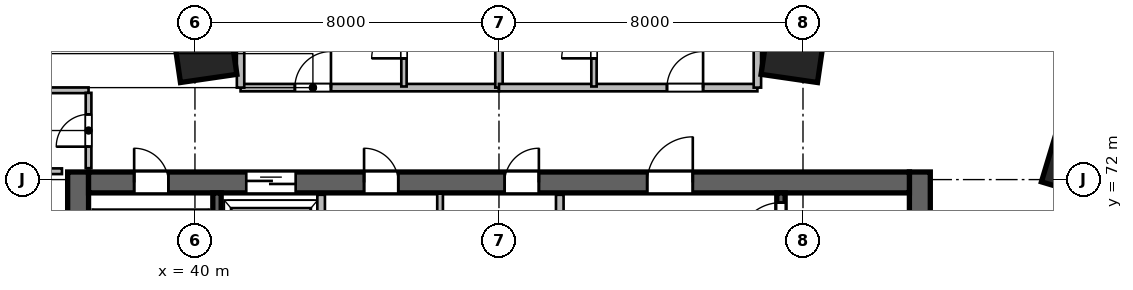
"""IFC4 building model, lengths in metres.
Left out: names, types, materials, properties, quantities, classifications, styles, units other than length and angle.
Written with IfcOpenShell. Run it as: python <this file> out.ifc"""

import sys

from ifc_helpers import new_model, si_unit, direction, frame, frame_2d, origin, origin_2d, place, context, subcontext, project, spatial, rectangle, extrude, source, transform, mapped, element, fill, save


model = new_model("IFC4")
c1 = context("Model", 3, precision=1e-05, world=origin(), true_north=direction((0.0, 1.0)))
c2 = subcontext(c1, "Body", "Model", "MODEL_VIEW")
j1 = project(units=[si_unit("LENGTHUNIT", "METRE"), si_unit("PLANEANGLEUNIT", "RADIAN")], contexts=[c1])
p1 = place(None, origin())
s1 = spatial("IfcSite", under=j1, at=p1, CompositionType="ELEMENT")
p2 = place(p1, origin())
s2 = spatial("IfcBuilding", under=s1, at=p2, CompositionType="ELEMENT")
p3 = place(p2, frame((0.0, 0.0, 46.2)))
s3 = spatial("IfcBuildingStorey", under=s2, at=p3, CompositionType="ELEMENT", Elevation=46.2)
m1 = source(origin(), c2, "Body", "SweptSolid", [
    extrude(rectangle(XDim=12.0, YDim=0.55, at=frame_2d((6.0, 0.0))), origin(), (0.0, 0.0, 1.0), 3.6),
])
for number, where, z_axis, x_axis in (
    (1, (36.925, 60.2, 0.0), (0.0, 0.0, 1.0), (0.0, 1.0, 0.0)),
    (2, (59.075, 60.2, 0.0), (0.0, 0.0, 1.0), (0.0, 1.0, 0.0)),
):
    element("IfcWall", number, at=place(p3, frame(where, z_axis=z_axis, x_axis=x_axis)), inside=s3, PredefinedType="SHEAR", context=c2, shape_type="MappedRepresentation", body=[
        mapped(m1, transform((0.0, 0.0, 0.0), scale=1.0)),
    ])
m2 = source(origin(), c2, "Body", "SweptSolid", [
    extrude(rectangle(XDim=21.6, YDim=0.55, at=frame_2d((10.8, 0.0))), origin(), (0.0, 0.0, 1.0), 3.6),
])
p4 = place(p3, frame((37.2, 71.925, 0.0), z_axis=(0.0, 0.0, 1.0), x_axis=(1.0, 0.0, 0.0)))
e3 = element("IfcWall", 3, at=p4, inside=s3, PredefinedType="SHEAR", context=c2, shape_type="MappedRepresentation", body=[
    mapped(m2, transform((0.0, 0.0, 0.0), scale=1.0)),
])
p5 = place(p4, frame((1.2, 0.0, 0.0)))
e4 = element("IfcOpeningElement", 4, at=p5, cuts=e3, PredefinedType="OPENING", context=c2, shape_type="SweptSolid", body=[
    extrude(rectangle(XDim=0.9, YDim=2.1, at=frame_2d((0.45, 1.05))), frame((0.0, 0.285, 0.0), z_axis=(0.0, -1.0, 0.0), x_axis=(1.0, 0.0, 0.0)), (0.0, 0.0, 1.0), 0.57),
])
p6 = place(p4, frame((14.7, 0.0, 0.0)))
e5 = element("IfcOpeningElement", 5, at=p6, cuts=e3, PredefinedType="OPENING", context=c2, shape_type="SweptSolid", body=[
    extrude(rectangle(XDim=1.2, YDim=2.15, at=frame_2d((0.6, 1.075))), frame((0.0, 0.285, 0.0), z_axis=(0.0, -1.0, 0.0), x_axis=(1.0, 0.0, 0.0)), (0.0, 0.0, 1.0), 0.57),
])
p7 = place(p4, frame((4.15, 0.0, 0.0)))
e6 = element("IfcOpeningElement", 6, at=p7, cuts=e3, PredefinedType="OPENING", context=c2, shape_type="SweptSolid", body=[
    extrude(rectangle(XDim=1.3, YDim=2.15, at=frame_2d((0.65, 1.075))), frame((0.0, 0.285, 0.0), z_axis=(0.0, -1.0, 0.0), x_axis=(1.0, 0.0, 0.0)), (0.0, 0.0, 1.0), 0.57),
])
p8 = place(p4, frame((7.25, 0.0, 0.0)))
e7 = element("IfcOpeningElement", 7, at=p8, cuts=e3, PredefinedType="OPENING", context=c2, shape_type="SweptSolid", body=[
    extrude(rectangle(XDim=0.9, YDim=2.1, at=frame_2d((0.45, 1.05))), frame((0.0, 0.285, 0.0), z_axis=(0.0, -1.0, 0.0), x_axis=(1.0, 0.0, 0.0)), (0.0, 0.0, 1.0), 0.57),
])
p9 = place(p4, frame((10.95, 0.0, 0.0)))
e8 = element("IfcOpeningElement", 8, at=p9, cuts=e3, PredefinedType="OPENING", context=c2, shape_type="SweptSolid", body=[
    extrude(rectangle(XDim=0.9, YDim=2.1, at=frame_2d((0.45, 1.05))), frame((0.0, 0.285, 0.0), z_axis=(0.0, -1.0, 0.0), x_axis=(1.0, 0.0, 0.0)), (0.0, 0.0, 1.0), 0.57),
])
m3 = source(origin(), c2, "Body", "SweptSolid", [
    extrude(rectangle(XDim=10.9, YDim=0.22, at=frame_2d((5.45, 0.0))), origin(), (0.0, 0.0, 1.0), 3.6),
])
p10 = place(p3, frame((40.58, 60.75, 0.0), z_axis=(0.0, 0.0, 1.0), x_axis=(0.0, 1.0, 0.0)))
e9 = element("IfcWall", 9, at=p10, inside=s3, PredefinedType="SHEAR", context=c2, shape_type="MappedRepresentation", body=[
    mapped(m3, transform((0.0, 0.0, 0.0), scale=1.0)),
])
p11 = place(p3, frame((55.42, 60.75, 0.0), z_axis=(0.0, 0.0, 1.0), x_axis=(0.0, 1.0, 0.0)))
e10 = element("IfcWall", 10, at=p11, inside=s3, PredefinedType="SHEAR", context=c2, shape_type="MappedRepresentation", body=[
    mapped(m3, transform((0.0, 0.0, 0.0), scale=1.0)),
])
p12 = place(p11, frame((9.495, 0.0, 0.0)))
e11 = element("IfcOpeningElement", 11, at=p12, cuts=e10, PredefinedType="OPENING", context=c2, shape_type="SweptSolid", body=[
    extrude(rectangle(XDim=1.15, YDim=2.15, at=frame_2d((0.575, 1.075))), frame((0.0, 0.12, 0.0), z_axis=(0.0, -1.0, 0.0), x_axis=(1.0, 0.0, 0.0)), (0.0, 0.0, 1.0), 0.24),
])
m4 = source(origin(), c2, "Body", "SweptSolid", [
    extrude(rectangle(XDim=1.5, YDim=1.5, at=origin_2d()), origin(), (0.0, 0.0, 1.0), 3.6),
])
for number, where, z_axis, x_axis in (
    (12, (40.253, 75.404, 0.0), (0.0, 0.0, 1.0), (-0.143, 0.99, 0.0)),
    (13, (55.747, 75.404, 0.0), (0.0, 0.0, 1.0), (0.143, 0.99, 0.0)),
    (14, (63.209, 72.442, 0.0), (0.0, 0.0, 1.0), (0.289, 0.957, 0.0)),
):
    element("IfcColumn", number, at=place(p3, frame(where, z_axis=z_axis, x_axis=x_axis)), inside=s3, PredefinedType="COLUMN", context=c2, shape_type="MappedRepresentation", body=[
        mapped(m4, transform((0.0, 0.0, 0.0), scale=1.0)),
    ])
m5 = source(origin(), c2, "Body", "SweptSolid", [
    extrude(rectangle(XDim=5.8, YDim=0.2, at=frame_2d((2.9, 0.0))), origin(), (0.0, 0.0, 1.0), 3.36),
])
p13 = place(p3, frame((49.6, 65.8, 0.0), z_axis=(0.0, 0.0, 1.0), x_axis=(0.0, 1.0, 0.0)))
e15 = element("IfcWall", 15, at=p13, inside=s3, PredefinedType="SOLIDWALL", context=c2, shape_type="MappedRepresentation", body=[
    mapped(m5, transform((0.0, 0.0, 0.0), scale=1.0)),
])
m6 = source(origin(), c2, "Body", "SweptSolid", [
    extrude(rectangle(XDim=3.2, YDim=0.2, at=frame_2d((1.6, 0.0))), origin(), (0.0, 0.0, 1.0), 3.36),
])
p14 = place(p3, frame((43.32, 68.4, 0.0), z_axis=(0.0, 0.0, 1.0), x_axis=(0.0, 1.0, 0.0)))
e16 = element("IfcWall", 16, at=p14, inside=s3, PredefinedType="SOLIDWALL", context=c2, shape_type="MappedRepresentation", body=[
    mapped(m6, transform((0.0, 0.0, 0.0), scale=1.0)),
])
m7 = source(origin(), c2, "Body", "SweptSolid", [
    extrude(rectangle(XDim=3.23, YDim=0.15, at=frame_2d((1.615, 0.0))), origin(), (0.0, 0.0, 1.0), 3.36),
])
p15 = place(p3, frame((46.45, 68.4, 0.0), z_axis=(0.0, 0.0, 1.0), x_axis=(0.0, 1.0, 0.0)))
e17 = element("IfcWall", 17, at=p15, inside=s3, PredefinedType="PARTITIONING", context=c2, shape_type="MappedRepresentation", body=[
    mapped(m7, transform((0.0, 0.0, 0.0), scale=1.0)),
])
m8 = source(origin(), c2, "Body", "SweptSolid", [
    extrude(rectangle(XDim=2.1, YDim=0.15, at=frame_2d((1.05, 0.0))), origin(), (0.0, 0.0, 1.0), 3.36),
])
p16 = place(p3, frame((34.4, 72.22, 0.0), z_axis=(0.0, 0.0, 1.0), x_axis=(1.0, 0.0, 0.0)))
e18 = element("IfcWall", 18, at=p16, inside=s3, PredefinedType="PARTITIONING", context=c2, shape_type="MappedRepresentation", body=[
    mapped(m8, transform((0.0, 0.0, 0.0), scale=1.0)),
])
m9 = source(origin(), c2, "Body", "SweptSolid", [
    extrude(rectangle(XDim=2.8, YDim=0.15, at=frame_2d((1.4, 0.0))), origin(), (0.0, 0.0, 1.0), 3.36),
])
p17 = place(p3, frame((34.4, 74.35, 0.0), z_axis=(0.0, 0.0, 1.0), x_axis=(1.0, 0.0, 0.0)))
e19 = element("IfcWall", 19, at=p17, inside=s3, PredefinedType="PARTITIONING", context=c2, shape_type="MappedRepresentation", body=[
    mapped(m9, transform((0.0, 0.0, 0.0), scale=1.0)),
])
m10 = source(origin(), c2, "Body", "SweptSolid", [
    extrude(rectangle(XDim=1.982, YDim=0.15, at=frame_2d((0.991, 0.0))), origin(), (0.0, 0.0, 1.0), 3.36),
])
p18 = place(p3, frame((37.2, 72.3, 0.0), z_axis=(0.0, 0.0, 1.0), x_axis=(0.0, 1.0, 0.0)))
e20 = element("IfcWall", 20, at=p18, inside=s3, PredefinedType="PARTITIONING", context=c2, shape_type="MappedRepresentation", body=[
    mapped(m10, transform((0.0, 0.0, 0.0), scale=1.0)),
])
p19 = place(p18, frame((0.566, 0.0, 0.0)))
e21 = element("IfcOpeningElement", 21, at=p19, cuts=e20, PredefinedType="OPENING", context=c2, shape_type="SweptSolid", body=[
    extrude(rectangle(XDim=0.85, YDim=2.1, at=frame_2d((0.425, 1.05))), frame((0.0, 0.085, 0.0), z_axis=(0.0, -1.0, 0.0), x_axis=(1.0, 0.0, 0.0)), (0.0, 0.0, 1.0), 0.17),
])
m11 = source(origin(), c2, "Body", "SweptSolid", [
    extrude(rectangle(XDim=6.8, YDim=0.195, at=frame_2d((3.4, 0.0))), origin(), (0.0, 0.0, 1.0), 3.36),
])
p20 = place(p3, frame((41.2, 74.42, 0.0), z_axis=(0.0, 0.0, 1.0), x_axis=(1.0, 0.0, 0.0)))
e22 = element("IfcWall", 22, at=p20, inside=s3, PredefinedType="PARTITIONING", context=c2, shape_type="MappedRepresentation", body=[
    mapped(m11, transform((0.0, 0.0, 0.0), scale=1.0)),
])
p21 = place(p20, frame((1.429, 0.0, 0.0)))
e23 = element("IfcOpeningElement", 23, at=p21, cuts=e22, PredefinedType="OPENING", context=c2, shape_type="SweptSolid", body=[
    extrude(rectangle(XDim=0.95, YDim=2.15, at=frame_2d((0.475, 1.075))), frame((0.0, 0.107, 0.0), z_axis=(0.0, -1.0, 0.0), x_axis=(1.0, 0.0, 0.0)), (0.0, 0.0, 1.0), 0.215),
])
m12 = source(origin(), c2, "Body", "SweptSolid", [
    extrude(rectangle(XDim=6.216, YDim=0.195, at=frame_2d((3.108, 0.0))), origin(), (0.0, 0.0, 1.0), 2.644),
])
p22 = place(p3, frame((48.0, 74.42, 0.0), z_axis=(0.0, 0.0, 1.0), x_axis=(0.0, 1.0, 0.0)))
e24 = element("IfcWall", 24, at=p22, inside=s3, PredefinedType="PARTITIONING", context=c2, shape_type="MappedRepresentation", body=[
    mapped(m12, transform((0.0, 0.0, 0.0), scale=1.0)),
])
m13 = source(origin(), c2, "Body", "SweptSolid", [
    extrude(rectangle(XDim=5.426, YDim=0.195, at=frame_2d((2.713, 0.0))), origin(), (0.0, 0.0, 1.0), 3.36),
])
p23 = place(p3, frame((41.2, 74.42, 0.0), z_axis=(0.0, 0.0, 1.0), x_axis=(0.0, 1.0, 0.0)))
e25 = element("IfcWall", 25, at=p23, inside=s3, PredefinedType="PARTITIONING", context=c2, shape_type="MappedRepresentation", body=[
    mapped(m13, transform((0.0, 0.0, 0.0), scale=1.0)),
])
m14 = source(origin(), c2, "Body", "SweptSolid", [
    extrude(rectangle(XDim=2.33, YDim=0.14, at=frame_2d((1.165, 0.0))), origin(), (0.0, 0.0, 1.0), 3.36),
])
p24 = place(p3, frame((45.5, 74.45, 0.0), z_axis=(0.0, 0.0, 1.0), x_axis=(0.0, 1.0, 0.0)))
e26 = element("IfcWall", 26, at=p24, inside=s3, PredefinedType="PARTITIONING", context=c2, shape_type="MappedRepresentation", body=[
    mapped(m14, transform((0.0, 0.0, 0.0), scale=1.0)),
])
p25 = place(p24, frame((0.74, 0.0, 0.0)))
e27 = element("IfcOpeningElement", 27, at=p25, cuts=e26, PredefinedType="OPENING", context=c2, shape_type="SweptSolid", body=[
    extrude(rectangle(XDim=0.85, YDim=2.05, at=frame_2d((0.425, 1.025))), frame((0.0, 0.08, 0.0), z_axis=(0.0, -1.0, 0.0), x_axis=(1.0, 0.0, 0.0)), (0.0, 0.0, 1.0), 0.16),
])
p26 = place(p3, frame((48.0, 74.42, 0.0), z_axis=(0.0, 0.0, 1.0), x_axis=(1.0, 0.0, 0.0)))
e28 = element("IfcWall", 28, at=p26, inside=s3, PredefinedType="PARTITIONING", context=c2, shape_type="MappedRepresentation", body=[
    mapped(m11, transform((0.0, 0.0, 0.0), scale=1.0)),
])
p27 = place(p26, frame((4.421, 0.0, 0.0)))
e29 = element("IfcOpeningElement", 29, at=p27, cuts=e28, PredefinedType="OPENING", context=c2, shape_type="SweptSolid", body=[
    extrude(rectangle(XDim=0.95, YDim=2.15, at=frame_2d((0.475, 1.075))), frame((0.0, 0.107, 0.0), z_axis=(0.0, -1.0, 0.0), x_axis=(1.0, 0.0, 0.0)), (0.0, 0.0, 1.0), 0.215),
])
p28 = place(p3, frame((54.8, 74.42, 0.0), z_axis=(0.0, 0.0, 1.0), x_axis=(0.0, 1.0, 0.0)))
e30 = element("IfcWall", 30, at=p28, inside=s3, PredefinedType="PARTITIONING", context=c2, shape_type="MappedRepresentation", body=[
    mapped(m13, transform((0.0, 0.0, 0.0), scale=1.0)),
])
p29 = place(p3, frame((50.5, 74.45, 0.0), z_axis=(0.0, 0.0, 1.0), x_axis=(0.0, 1.0, 0.0)))
e31 = element("IfcWall", 31, at=p29, inside=s3, PredefinedType="PARTITIONING", context=c2, shape_type="MappedRepresentation", body=[
    mapped(m14, transform((0.0, 0.0, 0.0), scale=1.0)),
])
p30 = place(p29, frame((0.74, 0.0, 0.0)))
e32 = element("IfcOpeningElement", 32, at=p30, cuts=e31, PredefinedType="OPENING", context=c2, shape_type="SweptSolid", body=[
    extrude(rectangle(XDim=0.85, YDim=2.05, at=frame_2d((0.425, 1.025))), frame((0.0, 0.08, 0.0), z_axis=(0.0, -1.0, 0.0), x_axis=(1.0, 0.0, 0.0)), (0.0, 0.0, 1.0), 0.16),
])
m15 = source(origin(), c2, "Body", "SweptSolid", [
    extrude(rectangle(XDim=0.9, YDim=2.1, at=frame_2d((0.45, 1.05))), frame((0.0, 0.025, 0.0), z_axis=(0.0, -1.0, 0.0), x_axis=(1.0, 0.0, 0.0)), (0.0, 0.0, 1.0), 0.05),
])
p31 = place(p5, origin())
e33 = element("IfcDoor", 33, at=p31, inside=s3, OperationType="SINGLE_SWING_LEFT", PredefinedType="DOOR", context=c2, shape_type="MappedRepresentation", body=[
    mapped(m15, transform((0.0, 0.0, 0.0), scale=1.0)),
])
fill(e4, e33)
m16 = source(origin(), c2, "Body", "SweptSolid", [
    extrude(rectangle(XDim=1.15, YDim=2.15, at=frame_2d((0.575, 1.075))), frame((0.0, 0.025, 0.0), z_axis=(0.0, -1.0, 0.0), x_axis=(1.0, 0.0, 0.0)), (0.0, 0.0, 1.0), 0.05),
])
p32 = place(p12, origin())
e34 = element("IfcDoor", 34, at=p32, inside=s3, OperationType="SINGLE_SWING_LEFT", PredefinedType="DOOR", context=c2, shape_type="MappedRepresentation", body=[
    mapped(m16, transform((0.0, 0.0, 0.0), scale=1.0)),
])
fill(e11, e34)
m17 = source(origin(), c2, "Body", "SweptSolid", [
    extrude(rectangle(XDim=1.2, YDim=2.15, at=frame_2d((0.6, 1.075))), frame((0.0, 0.025, 0.0), z_axis=(0.0, -1.0, 0.0), x_axis=(1.0, 0.0, 0.0)), (0.0, 0.0, 1.0), 0.05),
])
p33 = place(p6, origin())
e35 = element("IfcDoor", 35, at=p33, inside=s3, OperationType="SINGLE_SWING_RIGHT", PredefinedType="DOOR", context=c2, shape_type="MappedRepresentation", body=[
    mapped(m17, transform((0.0, 0.0, 0.0), scale=1.0)),
])
fill(e5, e35)
m18 = source(origin(), c2, "Body", "SweptSolid", [
    extrude(rectangle(XDim=1.3, YDim=2.15, at=frame_2d((0.65, 1.075))), frame((0.0, 0.025, 0.0), z_axis=(0.0, -1.0, 0.0), x_axis=(1.0, 0.0, 0.0)), (0.0, 0.0, 1.0), 0.05),
])
p34 = place(p7, origin())
e36 = element("IfcDoor", 36, at=p34, inside=s3, OperationType="DOUBLE_DOOR_SLIDING", PredefinedType="DOOR", context=c2, shape_type="MappedRepresentation", body=[
    mapped(m18, transform((0.0, 0.0, 0.0), scale=1.0)),
])
fill(e6, e36)
p35 = place(p8, origin())
e37 = element("IfcDoor", 37, at=p35, inside=s3, OperationType="SINGLE_SWING_LEFT", PredefinedType="DOOR", context=c2, shape_type="MappedRepresentation", body=[
    mapped(m15, transform((0.0, 0.0, 0.0), scale=1.0)),
])
fill(e7, e37)
p36 = place(p9, origin())
e38 = element("IfcDoor", 38, at=p36, inside=s3, OperationType="SINGLE_SWING_RIGHT", PredefinedType="DOOR", context=c2, shape_type="MappedRepresentation", body=[
    mapped(m15, transform((0.0, 0.0, 0.0), scale=1.0)),
])
fill(e8, e38)
m19 = source(origin(), c2, "Body", "SweptSolid", [
    extrude(rectangle(XDim=0.85, YDim=2.1, at=frame_2d((0.425, 1.05))), frame((0.0, 0.025, 0.0), z_axis=(0.0, -1.0, 0.0), x_axis=(1.0, 0.0, 0.0)), (0.0, 0.0, 1.0), 0.05),
])
p37 = place(p19, origin())
e39 = element("IfcDoor", 39, at=p37, inside=s3, OperationType="SINGLE_SWING_LEFT", PredefinedType="DOOR", context=c2, shape_type="MappedRepresentation", body=[
    mapped(m19, transform((0.0, 0.0, 0.0), scale=1.0)),
])
fill(e21, e39)
m20 = source(origin(), c2, "Body", "SweptSolid", [
    extrude(rectangle(XDim=0.95, YDim=2.15, at=frame_2d((0.475, 1.075))), frame((0.0, 0.025, 0.0), z_axis=(0.0, -1.0, 0.0), x_axis=(1.0, 0.0, 0.0)), (0.0, 0.0, 1.0), 0.05),
])
p38 = place(p21, origin())
e40 = element("IfcDoor", 40, at=p38, inside=s3, OperationType="SINGLE_SWING_RIGHT", PredefinedType="DOOR", context=c2, shape_type="MappedRepresentation", body=[
    mapped(m20, transform((0.0, 0.0, 0.0), scale=1.0)),
])
fill(e23, e40)
m21 = source(origin(), c2, "Body", "SweptSolid", [
    extrude(rectangle(XDim=0.85, YDim=2.05, at=frame_2d((0.425, 1.025))), frame((0.0, 0.025, 0.0), z_axis=(0.0, -1.0, 0.0), x_axis=(1.0, 0.0, 0.0)), (0.0, 0.0, 1.0), 0.05),
])
p39 = place(p25, origin())
e41 = element("IfcDoor", 41, at=p39, inside=s3, OperationType="SINGLE_SWING_LEFT", PredefinedType="DOOR", context=c2, shape_type="MappedRepresentation", body=[
    mapped(m21, transform((0.0, 0.0, 0.0), scale=1.0)),
])
fill(e27, e41)
p40 = place(p27, origin())
e42 = element("IfcDoor", 42, at=p40, inside=s3, OperationType="SINGLE_SWING_RIGHT", PredefinedType="DOOR", context=c2, shape_type="MappedRepresentation", body=[
    mapped(m20, transform((0.0, 0.0, 0.0), scale=1.0)),
])
fill(e29, e42)
p41 = place(p30, origin())
e43 = element("IfcDoor", 43, at=p41, inside=s3, OperationType="SINGLE_SWING_LEFT", PredefinedType="DOOR", context=c2, shape_type="MappedRepresentation", body=[
    mapped(m21, transform((0.0, 0.0, 0.0), scale=1.0)),
])
fill(e32, e43)
save(model, sys.argv[1])
